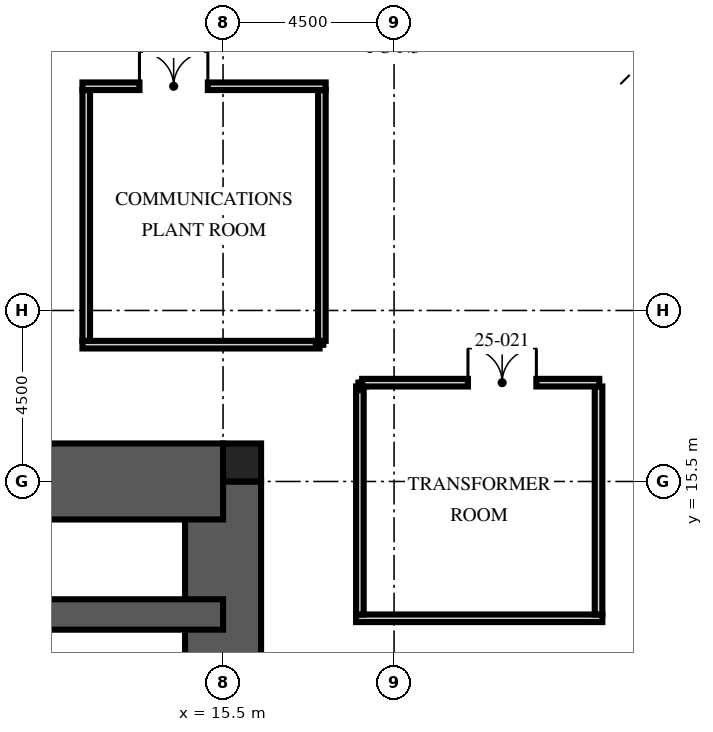
"""IFC4 building model, lengths in metres.
Left out: names, types, materials, properties, quantities, classifications, styles, units other than length and angle.
Written with IfcOpenShell. Run it as: python <this file> out.ifc"""

import sys

from ifc_helpers import new_model, si_unit, direction, frame, frame_2d, origin, origin_2d, place, context, subcontext, project, spatial, rectangle, hollow_rectangle, extrude, element, fill, save


model = new_model("IFC4")
c1 = context("Model", 3, precision=1e-05, world=origin(), true_north=direction((0.0, 1.0)))
c2 = subcontext(c1, "Body", "Model", "MODEL_VIEW")
j1 = project(units=[si_unit("LENGTHUNIT", "METRE"), si_unit("PLANEANGLEUNIT", "RADIAN")], contexts=[c1])
p1 = place(None, origin())
s1 = spatial("IfcSite", under=j1, at=p1, CompositionType="ELEMENT")
p2 = place(p1, origin())
s2 = spatial("IfcBuilding", under=s1, at=p2, CompositionType="ELEMENT")
p3 = place(p2, frame((0.0, 0.0, 99.75)))
s3 = spatial("IfcBuildingStorey", under=s2, at=p3, CompositionType="ELEMENT", Elevation=99.75)
p4 = place(p3, frame((15.5, -15.5, -0.35), z_axis=(0.0, 0.0, 1.0), x_axis=(0.0, 1.0, 0.0)))
e1 = element("IfcWall", 1, at=p4, inside=s3, PredefinedType="SHEAR", context=c2, shape_type="SweptSolid", body=[
    extrude(rectangle(XDim=31.0, YDim=2.0, at=frame_2d((15.5, 0.0))), origin(), (0.0, 0.0, 1.0), 7.6),
])
p5 = place(p4, frame((6.5, 0.0, 0.35)))
e2 = element("IfcOpeningElement", 2, at=p5, cuts=e1, PredefinedType="OPENING", context=c2, shape_type="SweptSolid", body=[
    extrude(rectangle(XDim=1.2, YDim=2.1, at=frame_2d((0.6, 1.05))), frame((0.0, 1.01, 0.0), z_axis=(0.0, -1.0, 0.0), x_axis=(1.0, 0.0, 0.0)), (0.0, 0.0, 1.0), 2.02),
])
p6 = place(p4, frame((22.7, 0.0, 0.35)))
e3 = element("IfcOpeningElement", 3, at=p6, cuts=e1, PredefinedType="OPENING", context=c2, shape_type="SweptSolid", body=[
    extrude(rectangle(XDim=1.8, YDim=2.1, at=frame_2d((0.9, 1.05))), frame((0.0, 1.01, 0.0), z_axis=(0.0, -1.0, 0.0), x_axis=(1.0, 0.0, 0.0)), (0.0, 0.0, 1.0), 2.02),
])
p7 = place(p3, frame((-15.5, 15.5, -0.35), z_axis=(0.0, 0.0, 1.0), x_axis=(1.0, 0.0, 0.0)))
e4 = element("IfcWall", 4, at=p7, inside=s3, PredefinedType="SHEAR", context=c2, shape_type="SweptSolid", body=[
    extrude(rectangle(XDim=31.0, YDim=2.0, at=frame_2d((15.5, 0.0))), origin(), (0.0, 0.0, 1.0), 7.6),
])
p8 = place(p3, frame((-15.5, 12.0, -0.35), z_axis=(0.0, 0.0, 1.0), x_axis=(1.0, 0.0, 0.0)))
e5 = element("IfcWall", 5, at=p8, inside=s3, PredefinedType="SHEAR", context=c2, shape_type="SweptSolid", body=[
    extrude(rectangle(XDim=31.0, YDim=0.8, at=frame_2d((15.5, 0.0))), origin(), (0.0, 0.0, 1.0), 7.6),
])
p9 = place(p3, frame((16.0, 16.0, -0.35), z_axis=(0.0, 0.0, 1.0), x_axis=(1.0, 0.0, 0.0)))
e6 = element("IfcColumn", 6, at=p9, inside=s3, PredefinedType="COLUMN", context=c2, shape_type="SweptSolid", body=[
    extrude(rectangle(XDim=1.0, YDim=1.0, at=origin_2d()), origin(), (0.0, 0.0, 1.0), 7.6),
])
p10 = place(p3, frame((10.0, 29.8, -0.65), z_axis=(-0.103601510687, -0.332963994967, 0.937230870724), x_axis=(0.994618884766, -0.034712905596, 0.097612951251)))
e7 = element("IfcColumn", 7, at=p10, inside=s3, PredefinedType="COLUMN", context=c2, shape_type="SweptSolid", body=[
    extrude(hollow_rectangle(XDim=3.2, YDim=1.8, WallThickness=0.2, at=origin_2d()), origin(), (0.0, 0.0, 1.0), 8.109),
])
for number, where, z_axis, x_axis in (
    (8, (20.0, 29.8, -0.65), (-0.204, -0.328, 0.923), (0.979, -0.068, 0.192)),
    (9, (29.8, 20.0, -0.65), (-0.328, -0.204, 0.923), (-0.068, 0.979, 0.192)),
):
    element("IfcColumn", number, at=place(p3, frame(where, z_axis=z_axis, x_axis=x_axis)), inside=s3, PredefinedType="COLUMN", context=c2, shape_type="SweptSolid", body=[
        extrude(hollow_rectangle(XDim=3.2, YDim=1.8, WallThickness=0.2, at=origin_2d()), origin(), (0.0, 0.0, 1.0), 8.238),
    ])
p11 = place(p3, frame((29.8, 10.0, -0.65), z_axis=(-0.332963994967, -0.103601510687, 0.937230870724), x_axis=(-0.034712905596, 0.994618884766, 0.097612951251)))
e10 = element("IfcColumn", 10, at=p11, inside=s3, PredefinedType="COLUMN", context=c2, shape_type="SweptSolid", body=[
    extrude(hollow_rectangle(XDim=3.2, YDim=1.8, WallThickness=0.2, at=origin_2d()), origin(), (0.0, 0.0, 1.0), 8.109),
])
p12 = place(p3, frame((28.394, 28.394, -0.65), z_axis=(-0.300622896132, -0.300622896132, 0.905125266824), x_axis=(0.707106781187, -0.707106781187, 0.0)))
e11 = element("IfcColumn", 11, at=p12, inside=s3, PredefinedType="COLUMN", context=c2, shape_type="SweptSolid", body=[
    extrude(hollow_rectangle(XDim=1.6, YDim=1.6, WallThickness=0.1, at=origin_2d()), origin(), (0.0, 0.0, 1.0), 8.396),
])
p13 = place(p3, frame((19.0, 11.9, 0.0), z_axis=(0.0, 0.0, 1.0), x_axis=(1.0, 0.0, 0.0)))
e12 = element("IfcWall", 12, at=p13, inside=s3, PredefinedType="SOLIDWALL", context=c2, shape_type="SweptSolid", body=[
    extrude(rectangle(XDim=6.48, YDim=0.2, at=frame_2d((3.24, 0.0))), origin(), (0.0, 0.0, 1.0), 7.25),
])
for number, where, z_axis, x_axis in (
    (13, (19.1, 12.0, 0.0), (0.0, 0.0, 1.0), (0.0, 1.0, 0.0)),
    (14, (25.38, 12.0, 0.0), (0.0, 0.0, 1.0), (0.0, 1.0, 0.0)),
):
    element("IfcWall", number, at=place(p3, frame(where, z_axis=z_axis, x_axis=x_axis)), inside=s3, PredefinedType="SOLIDWALL", context=c2, shape_type="SweptSolid", body=[
        extrude(rectangle(XDim=6.0, YDim=0.2, at=frame_2d((3.0, 0.0))), origin(), (0.0, 0.0, 1.0), 6.46),
    ])
p14 = place(p3, frame((19.161, 18.0, 0.0), z_axis=(0.0, 0.0, 1.0), x_axis=(-1.0, 0.0, 0.0)))
e15 = element("IfcWall", 15, at=p14, inside=s3, PredefinedType="SOLIDWALL", context=c2, shape_type="SweptSolid", body=[
    extrude(rectangle(XDim=0.061, YDim=0.2, at=frame_2d((0.03, 0.0))), origin(), (0.0, 0.0, 1.0), 7.25),
])
p15 = place(p3, frame((19.161, 18.1, 0.0), z_axis=(0.0, 0.0, 1.0), x_axis=(0.0, -1.0, 0.0)))
e16 = element("IfcWall", 16, at=p15, inside=s3, PredefinedType="SOLIDWALL", context=c2, shape_type="SweptSolid", body=[
    extrude(rectangle(XDim=0.1, YDim=0.2, at=frame_2d((0.05, 0.0))), origin(), (0.0, 0.0, 1.0), 7.25),
])
p16 = place(p3, frame((19.161, 18.1, 0.0), z_axis=(0.0, 0.0, 1.0), x_axis=(1.0, 0.0, 0.0)))
e17 = element("IfcWall", 17, at=p16, inside=s3, PredefinedType="SOLIDWALL", context=c2, shape_type="SweptSolid", body=[
    extrude(rectangle(XDim=6.239, YDim=0.2, at=frame_2d((3.12, 0.0))), origin(), (0.0, 0.0, 1.0), 6.45),
])
p17 = place(p16, frame((2.783, 0.0, 0.0)))
e18 = element("IfcOpeningElement", 18, at=p17, cuts=e17, PredefinedType="OPENING", context=c2, shape_type="SweptSolid", body=[
    extrude(rectangle(XDim=1.8, YDim=2.4, at=frame_2d((0.9, 1.2))), frame((0.0, 0.11, 0.0), z_axis=(0.0, -1.0, 0.0), x_axis=(1.0, 0.0, 0.0)), (0.0, 0.0, 1.0), 0.22),
])
p18 = place(p3, frame((11.8, 19.1, 0.0), z_axis=(0.0, 0.0, 1.0), x_axis=(1.0, 0.0, 0.0)))
e19 = element("IfcWall", 19, at=p18, inside=s3, PredefinedType="SOLIDWALL", context=c2, shape_type="SweptSolid", body=[
    extrude(rectangle(XDim=6.239, YDim=0.2, at=frame_2d((3.12, 0.0))), origin(), (0.0, 0.0, 1.0), 6.46),
])
p19 = place(p3, frame((18.039, 19.1, 0.0), z_axis=(0.0, 0.0, 1.0), x_axis=(0.0, 1.0, 0.0)))
e20 = element("IfcWall", 20, at=p19, inside=s3, PredefinedType="SOLIDWALL", context=c2, shape_type="SweptSolid", body=[
    extrude(rectangle(XDim=0.1, YDim=0.2, at=frame_2d((0.05, 0.0))), origin(), (0.0, 0.0, 1.0), 7.25),
])
p20 = place(p3, frame((11.9, 19.2, 0.0), z_axis=(0.0, 0.0, 1.0), x_axis=(0.0, 1.0, 0.0)))
e21 = element("IfcWall", 21, at=p20, inside=s3, PredefinedType="SOLIDWALL", context=c2, shape_type="SweptSolid", body=[
    extrude(rectangle(XDim=6.6, YDim=0.2, at=frame_2d((3.3, 0.0))), origin(), (0.0, 0.0, 1.0), 7.25),
])
p21 = place(p3, frame((18.039, 19.2, 0.0), z_axis=(0.0, 0.0, 1.0), x_axis=(1.0, 0.0, 0.0)))
e22 = element("IfcWall", 22, at=p21, inside=s3, PredefinedType="SOLIDWALL", context=c2, shape_type="SweptSolid", body=[
    extrude(rectangle(XDim=0.061, YDim=0.2, at=frame_2d((0.03, 0.0))), origin(), (0.0, 0.0, 1.0), 7.25),
])
p22 = place(p3, frame((18.1, 19.2, 0.0), z_axis=(0.0, 0.0, 1.0), x_axis=(0.0, 1.0, 0.0)))
e23 = element("IfcWall", 23, at=p22, inside=s3, PredefinedType="SOLIDWALL", context=c2, shape_type="SweptSolid", body=[
    extrude(rectangle(XDim=6.6, YDim=0.2, at=frame_2d((3.3, 0.0))), origin(), (0.0, 0.0, 1.0), 6.45),
])
p23 = place(p3, frame((11.8, 25.9, 0.0), z_axis=(0.0, 0.0, 1.0), x_axis=(1.0, 0.0, 0.0)))
e24 = element("IfcWall", 24, at=p23, inside=s3, PredefinedType="SOLIDWALL", context=c2, shape_type="SweptSolid", body=[
    extrude(rectangle(XDim=6.4, YDim=0.2, at=frame_2d((3.2, 0.0))), origin(), (0.0, 0.0, 1.0), 6.45),
])
p24 = place(p23, frame((1.5, 0.0, 0.0)))
e25 = element("IfcOpeningElement", 25, at=p24, cuts=e24, PredefinedType="OPENING", context=c2, shape_type="SweptSolid", body=[
    extrude(rectangle(XDim=1.8, YDim=2.4, at=frame_2d((0.9, 1.2))), frame((0.0, 0.11, 0.0), z_axis=(0.0, -1.0, 0.0), x_axis=(1.0, 0.0, 0.0)), (0.0, 0.0, 1.0), 0.22),
])
p25 = place(p17, origin())
e26 = element("IfcDoor", 26, at=p25, inside=s3, OperationType="DOUBLE_DOOR_SINGLE_SWING", PredefinedType="DOOR", context=c2, shape_type="SweptSolid", body=[
    extrude(rectangle(XDim=1.8, YDim=2.4, at=frame_2d((0.9, 1.2))), frame((0.0, 0.025, 0.0), z_axis=(0.0, -1.0, 0.0), x_axis=(1.0, 0.0, 0.0)), (0.0, 0.0, 1.0), 0.05),
])
fill(e18, e26)
p26 = place(p24, origin())
e27 = element("IfcDoor", 27, at=p26, inside=s3, OperationType="DOUBLE_DOOR_SINGLE_SWING", PredefinedType="DOOR", context=c2, shape_type="SweptSolid", body=[
    extrude(rectangle(XDim=1.8, YDim=2.4, at=frame_2d((0.9, 1.2))), frame((0.0, 0.025, 0.0), z_axis=(0.0, -1.0, 0.0), x_axis=(1.0, 0.0, 0.0)), (0.0, 0.0, 1.0), 0.05),
])
fill(e25, e27)
save(model, sys.argv[1])
